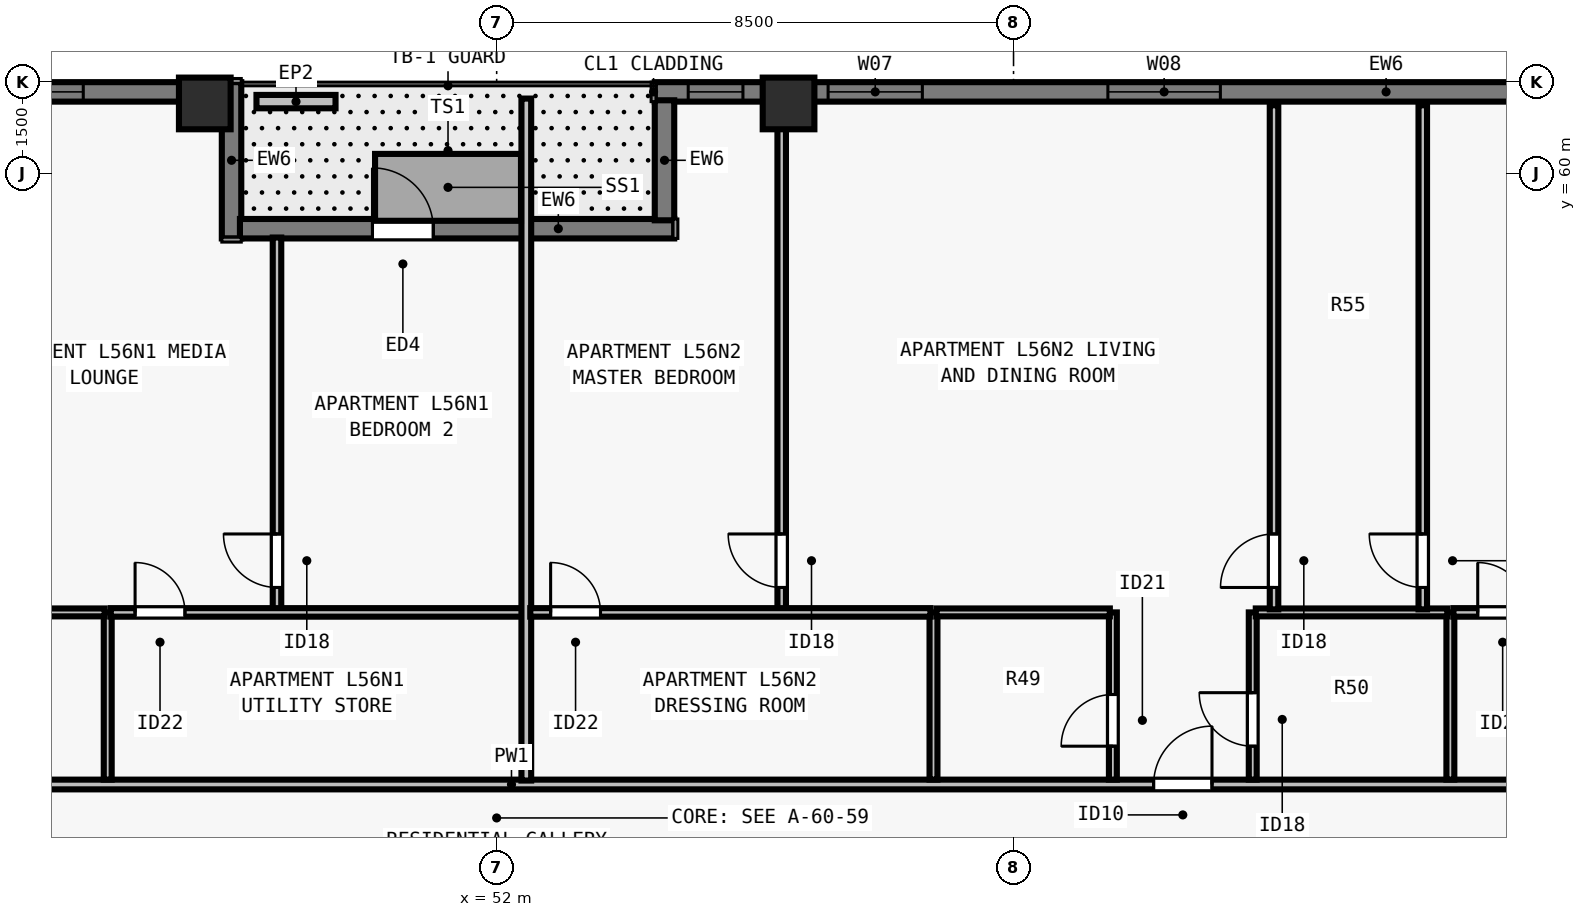
"""IFC4 building model, lengths in metres.
Left out: names, types, materials, properties, quantities, classifications, styles, units other than length and angle.
Written with IfcOpenShell. Run it as: python <this file> out.ifc"""

import sys

from ifc_helpers import new_model, si_unit, direction, frame, frame_2d, origin, origin_2d, place, context, subcontext, project, spatial, rectangle, extrude, element, fill, save


model = new_model("IFC4")
c1 = context("Model", 3, precision=1e-05, world=origin(), true_north=direction((0.0, 1.0)))
c2 = subcontext(c1, "Body", "Model", "MODEL_VIEW")
j1 = project(units=[si_unit("LENGTHUNIT", "METRE"), si_unit("PLANEANGLEUNIT", "RADIAN")], contexts=[c1])
p1 = place(None, origin())
s1 = spatial("IfcSite", under=j1, at=p1, CompositionType="ELEMENT")
p2 = place(p1, origin())
s2 = spatial("IfcBuilding", under=s1, at=p2, CompositionType="ELEMENT")
p3 = place(p2, frame((0.0, 0.0, 206.0)))
s3 = spatial("IfcBuildingStorey", under=s2, at=p3, CompositionType="ELEMENT", Elevation=206.0)
for number, where, z_axis, x_axis in (
    (1, (56.8, 61.15, 0.0), (0.0, 0.0, 1.0), (1.0, 0.0, 0.0)),
    (2, (47.2, 61.15, 0.0), (0.0, 0.0, 1.0), (1.0, 0.0, 0.0)),
):
    element("IfcColumn", number, at=place(p3, frame(where, z_axis=z_axis, x_axis=x_axis)), inside=s3, PredefinedType="COLUMN", context=c2, shape_type="SweptSolid", body=[
        extrude(rectangle(XDim=0.85, YDim=0.85, at=origin_2d()), origin(), (0.0, 0.0, 1.0), 3.5),
    ])
p4 = place(p3, frame((54.6, 61.34, 0.0), z_axis=(0.0, 0.0, 1.0), x_axis=(1.0, 0.0, 0.0)))
e3 = element("IfcWall", 3, at=p4, inside=s3, PredefinedType="SOLIDWALL", context=c2, shape_type="SweptSolid", body=[
    extrude(rectangle(XDim=14.602, YDim=0.32, at=frame_2d((7.301, 0.0))), origin(), (0.0, 0.0, 1.0), 3.29),
])
p5 = place(p4, frame((2.851, 0.0, 0.8)))
e4 = element("IfcOpeningElement", 4, at=p5, cuts=e3, PredefinedType="OPENING", context=c2, shape_type="SweptSolid", body=[
    extrude(rectangle(XDim=1.55, YDim=1.678, at=frame_2d((0.775, 0.839))), frame((0.0, 0.17, 0.0), z_axis=(0.0, -1.0, 0.0), x_axis=(1.0, 0.0, 0.0)), (0.0, 0.0, 1.0), 0.34),
])
p6 = place(p4, frame((7.451, 0.0, 0.8)))
e5 = element("IfcOpeningElement", 5, at=p6, cuts=e3, PredefinedType="OPENING", context=c2, shape_type="SweptSolid", body=[
    extrude(rectangle(XDim=1.85, YDim=1.678, at=frame_2d((0.925, 0.839))), frame((0.0, 0.17, 0.0), z_axis=(0.0, -1.0, 0.0), x_axis=(1.0, 0.0, 0.0)), (0.0, 0.0, 1.0), 0.34),
])
p7 = place(p4, frame((0.55, 0.0, 0.8)))
e6 = element("IfcOpeningElement", 6, at=p7, cuts=e3, PredefinedType="OPENING", context=c2, shape_type="SweptSolid", body=[
    extrude(rectangle(XDim=0.9, YDim=1.678, at=frame_2d((0.45, 0.839))), frame((0.0, 0.17, 0.0), z_axis=(0.0, -1.0, 0.0), x_axis=(1.0, 0.0, 0.0)), (0.0, 0.0, 1.0), 0.34),
])
p8 = place(p3, frame((34.5, 61.34, 0.0), z_axis=(0.0, 0.0, 1.0), x_axis=(1.0, 0.0, 0.0)))
e7 = element("IfcWall", 7, at=p8, inside=s3, PredefinedType="SOLIDWALL", context=c2, shape_type="SweptSolid", body=[
    extrude(rectangle(XDim=13.002, YDim=0.32, at=frame_2d((6.501, 0.0))), origin(), (0.0, 0.0, 1.0), 3.29),
])
p9 = place(p8, frame((5.051, 0.0, 0.8)))
e8 = element("IfcOpeningElement", 8, at=p9, cuts=e7, PredefinedType="OPENING", context=c2, shape_type="SweptSolid", body=[
    extrude(rectangle(XDim=1.55, YDim=1.678, at=frame_2d((0.775, 0.839))), frame((0.0, 0.17, 0.0), z_axis=(0.0, -1.0, 0.0), x_axis=(1.0, 0.0, 0.0)), (0.0, 0.0, 1.0), 0.34),
])
p10 = place(p8, frame((8.852, 0.0, 0.8)))
e9 = element("IfcOpeningElement", 9, at=p10, cuts=e7, PredefinedType="OPENING", context=c2, shape_type="SweptSolid", body=[
    extrude(rectangle(XDim=1.85, YDim=1.678, at=frame_2d((0.925, 0.839))), frame((0.0, 0.17, 0.0), z_axis=(0.0, -1.0, 0.0), x_axis=(1.0, 0.0, 0.0)), (0.0, 0.0, 1.0), 0.34),
])
p11 = place(p3, frame((47.64, 61.5, 0.0), z_axis=(0.0, 0.0, 1.0), x_axis=(0.0, -1.0, 0.0)))
e10 = element("IfcWall", 10, at=p11, inside=s3, PredefinedType="SOLIDWALL", context=c2, shape_type="SweptSolid", body=[
    extrude(rectangle(XDim=2.57, YDim=0.32, at=frame_2d((1.285, 0.0))), origin(), (0.0, 0.0, 1.0), 3.29),
])
p12 = place(p3, frame((47.778, 59.09, 0.0), z_axis=(0.0, 0.0, 1.0), x_axis=(1.0, 0.0, 0.0)))
e11 = element("IfcWall", 11, at=p12, inside=s3, PredefinedType="SOLIDWALL", context=c2, shape_type="SweptSolid", body=[
    extrude(rectangle(XDim=7.142, YDim=0.32, at=frame_2d((3.571, 0.0))), origin(), (0.0, 0.0, 1.0), 3.29),
])
p13 = place(p12, frame((2.18, 0.0, 0.0)))
e12 = element("IfcOpeningElement", 12, at=p13, cuts=e11, PredefinedType="OPENING", context=c2, shape_type="SweptSolid", body=[
    extrude(rectangle(XDim=1.0, YDim=2.15, at=frame_2d((0.5, 1.075))), frame((0.0, 0.17, 0.0), z_axis=(0.0, -1.0, 0.0), x_axis=(1.0, 0.0, 0.0)), (0.0, 0.0, 1.0), 0.34),
])
p14 = place(p3, frame((54.76, 59.228, 0.0), z_axis=(0.0, 0.0, 1.0), x_axis=(0.0, 1.0, 0.0)))
e13 = element("IfcWall", 13, at=p14, inside=s3, PredefinedType="SOLIDWALL", context=c2, shape_type="SweptSolid", body=[
    extrude(rectangle(XDim=1.974, YDim=0.32, at=frame_2d((0.987, 0.0))), origin(), (0.0, 0.0, 1.0), 3.29),
])
p15 = place(p3, frame((48.05, 61.18, 0.0), z_axis=(0.0, 0.0, 1.0), x_axis=(1.0, 0.0, 0.0)))
e14 = element("IfcWall", 14, at=p15, inside=s3, PredefinedType="PARAPET", context=c2, shape_type="SweptSolid", body=[
    extrude(rectangle(XDim=1.3, YDim=0.22, at=frame_2d((0.65, 0.0))), origin(), (0.0, 0.0, 1.0), 0.55),
])
p16 = place(p3, frame((29.805, 49.95, 0.0), z_axis=(0.0, 0.0, 1.0), x_axis=(1.0, 0.0, 0.0)))
e15 = element("IfcWall", 15, at=p16, inside=s3, PredefinedType="PARTITIONING", context=c2, shape_type="SweptSolid", body=[
    extrude(rectangle(XDim=44.39, YDim=0.16, at=frame_2d((22.195, 0.0))), origin(), (0.0, 0.0, 1.0), 2.958),
])
p17 = place(p16, frame((10.919, 0.0, 0.0)))
e16 = element("IfcOpeningElement", 16, at=p17, cuts=e15, PredefinedType="OPENING", context=c2, shape_type="SweptSolid", body=[
    extrude(rectangle(XDim=0.96, YDim=2.18, at=frame_2d((0.48, 1.09))), frame((0.0, 0.09, 0.0), z_axis=(0.0, -1.0, 0.0), x_axis=(1.0, 0.0, 0.0)), (0.0, 0.0, 1.0), 0.18),
])
p18 = place(p16, frame((32.999, 0.0, 0.0)))
e17 = element("IfcOpeningElement", 17, at=p18, cuts=e15, PredefinedType="OPENING", context=c2, shape_type="SweptSolid", body=[
    extrude(rectangle(XDim=0.96, YDim=2.18, at=frame_2d((0.48, 1.09))), frame((0.0, 0.09, 0.0), z_axis=(0.0, -1.0, 0.0), x_axis=(1.0, 0.0, 0.0)), (0.0, 0.0, 1.0), 0.18),
])
p19 = place(p3, frame((45.604, 50.03, 0.0), z_axis=(0.0, 0.0, 1.0), x_axis=(0.0, 1.0, 0.0)))
e18 = element("IfcWall", 18, at=p19, inside=s3, PredefinedType="PLUMBINGWALL", context=c2, shape_type="SweptSolid", body=[
    extrude(rectangle(XDim=2.75, YDim=0.13, at=frame_2d((1.375, 0.0))), origin(), (0.0, 0.0, 1.0), 3.29),
])
p20 = place(p3, frame((42.404, 52.78, 0.0), z_axis=(0.0, 0.0, 1.0), x_axis=(1.0, 0.0, 0.0)))
e19 = element("IfcWall", 19, at=p20, inside=s3, PredefinedType="PLUMBINGWALL", context=c2, shape_type="SweptSolid", body=[
    extrude(rectangle(XDim=3.15, YDim=0.13, at=frame_2d((1.575, 0.0))), origin(), (0.0, 0.0, 1.0), 3.29),
])
p21 = place(p3, frame((48.387, 52.74, 0.0), z_axis=(0.0, 0.0, 1.0), x_axis=(0.0, 1.0, 0.0)))
e20 = element("IfcWall", 20, at=p21, inside=s3, PredefinedType="PARTITIONING", context=c2, shape_type="SweptSolid", body=[
    extrude(rectangle(XDim=6.205, YDim=0.14, at=frame_2d((3.103, 0.0))), origin(), (0.0, 0.0, 1.0), 3.29),
])
p22 = place(p21, frame((0.45, 0.0, 0.0)))
e21 = element("IfcOpeningElement", 21, at=p22, cuts=e20, PredefinedType="OPENING", context=c2, shape_type="SweptSolid", body=[
    extrude(rectangle(XDim=0.88, YDim=2.1, at=frame_2d((0.44, 1.05))), frame((0.0, 0.08, 0.0), z_axis=(0.0, -1.0, 0.0), x_axis=(1.0, 0.0, 0.0)), (0.0, 0.0, 1.0), 0.16),
])
p23 = place(p3, frame((45.654, 52.78, 0.0), z_axis=(0.0, 0.0, 1.0), x_axis=(1.0, 0.0, 0.0)))
e22 = element("IfcWall", 22, at=p23, inside=s3, PredefinedType="PARTITIONING", context=c2, shape_type="SweptSolid", body=[
    extrude(rectangle(XDim=6.884, YDim=0.14, at=frame_2d((3.442, 0.0))), origin(), (0.0, 0.0, 1.0), 3.29),
])
p24 = place(p23, frame((0.4, 0.0, 0.0)))
e23 = element("IfcOpeningElement", 23, at=p24, cuts=e22, PredefinedType="OPENING", context=c2, shape_type="SweptSolid", body=[
    extrude(rectangle(XDim=0.82, YDim=2.1, at=frame_2d((0.41, 1.05))), frame((0.0, 0.08, 0.0), z_axis=(0.0, -1.0, 0.0), x_axis=(1.0, 0.0, 0.0)), (0.0, 0.0, 1.0), 0.16),
])
p25 = place(p3, frame((52.488, 50.015, 0.0), z_axis=(0.0, 0.0, 1.0), x_axis=(0.0, 1.0, 0.0)))
e24 = element("IfcWall", 24, at=p25, inside=s3, PredefinedType="PARTITIONING", context=c2, shape_type="SweptSolid", body=[
    extrude(rectangle(XDim=11.215, YDim=0.16, at=frame_2d((5.607, 0.0))), origin(), (0.0, 0.0, 1.0), 2.958),
])
p26 = place(p3, frame((59.184, 50.03, 0.0), z_axis=(0.0, 0.0, 1.0), x_axis=(0.0, 1.0, 0.0)))
e25 = element("IfcWall", 25, at=p26, inside=s3, PredefinedType="PLUMBINGWALL", context=c2, shape_type="SweptSolid", body=[
    extrude(rectangle(XDim=2.75, YDim=0.13, at=frame_2d((1.375, 0.0))), origin(), (0.0, 0.0, 1.0), 3.29),
])
p27 = place(p3, frame((62.134, 50.03, 0.0), z_axis=(0.0, 0.0, 1.0), x_axis=(0.0, 1.0, 0.0)))
e26 = element("IfcWall", 26, at=p27, inside=s3, PredefinedType="PLUMBINGWALL", context=c2, shape_type="SweptSolid", body=[
    extrude(rectangle(XDim=2.75, YDim=0.13, at=frame_2d((1.375, 0.0))), origin(), (0.0, 0.0, 1.0), 2.573),
])
p28 = place(p27, frame((0.55, 0.0, 0.0)))
e27 = element("IfcOpeningElement", 27, at=p28, cuts=e26, PredefinedType="OPENING", context=c2, shape_type="SweptSolid", body=[
    extrude(rectangle(XDim=0.85, YDim=2.08, at=frame_2d((0.425, 1.04))), frame((0.0, 0.075, 0.0), z_axis=(0.0, -1.0, 0.0), x_axis=(1.0, 0.0, 0.0)), (0.0, 0.0, 1.0), 0.15),
])
p29 = place(p3, frame((59.234, 52.78, 0.0), z_axis=(0.0, 0.0, 1.0), x_axis=(1.0, 0.0, 0.0)))
e28 = element("IfcWall", 28, at=p29, inside=s3, PredefinedType="PLUMBINGWALL", context=c2, shape_type="SweptSolid", body=[
    extrude(rectangle(XDim=2.85, YDim=0.13, at=frame_2d((1.425, 0.0))), origin(), (0.0, 0.0, 1.0), 3.29),
])
p30 = place(p3, frame((67.684, 50.03, 0.0), z_axis=(0.0, 0.0, 1.0), x_axis=(0.0, 1.0, 0.0)))
e29 = element("IfcWall", 29, at=p30, inside=s3, PredefinedType="PLUMBINGWALL", context=c2, shape_type="SweptSolid", body=[
    extrude(rectangle(XDim=2.75, YDim=0.13, at=frame_2d((1.375, 0.0))), origin(), (0.0, 0.0, 1.0), 3.29),
])
p31 = place(p3, frame((64.434, 50.03, 0.0), z_axis=(0.0, 0.0, 1.0), x_axis=(0.0, 1.0, 0.0)))
e30 = element("IfcWall", 30, at=p31, inside=s3, PredefinedType="PLUMBINGWALL", context=c2, shape_type="SweptSolid", body=[
    extrude(rectangle(XDim=2.75, YDim=0.13, at=frame_2d((1.375, 0.0))), origin(), (0.0, 0.0, 1.0), 3.29),
])
p32 = place(p31, frame((0.55, 0.0, 0.0)))
e31 = element("IfcOpeningElement", 31, at=p32, cuts=e30, PredefinedType="OPENING", context=c2, shape_type="SweptSolid", body=[
    extrude(rectangle(XDim=0.88, YDim=2.1, at=frame_2d((0.44, 1.05))), frame((0.0, 0.075, 0.0), z_axis=(0.0, -1.0, 0.0), x_axis=(1.0, 0.0, 0.0)), (0.0, 0.0, 1.0), 0.15),
])
p33 = place(p3, frame((64.484, 52.78, 0.0), z_axis=(0.0, 0.0, 1.0), x_axis=(1.0, 0.0, 0.0)))
e32 = element("IfcWall", 32, at=p33, inside=s3, PredefinedType="PLUMBINGWALL", context=c2, shape_type="SweptSolid", body=[
    extrude(rectangle(XDim=3.15, YDim=0.13, at=frame_2d((1.575, 0.0))), origin(), (0.0, 0.0, 1.0), 3.29),
])
p34 = place(p3, frame((56.688, 52.74, 0.0), z_axis=(0.0, 0.0, 1.0), x_axis=(0.0, 1.0, 0.0)))
e33 = element("IfcWall", 33, at=p34, inside=s3, PredefinedType="PARTITIONING", context=c2, shape_type="SweptSolid", body=[
    extrude(rectangle(XDim=8.38, YDim=0.14, at=frame_2d((4.19, 0.0))), origin(), (0.0, 0.0, 1.0), 2.573),
])
p35 = place(p34, frame((0.45, 0.0, 0.0)))
e34 = element("IfcOpeningElement", 34, at=p35, cuts=e33, PredefinedType="OPENING", context=c2, shape_type="SweptSolid", body=[
    extrude(rectangle(XDim=0.88, YDim=2.1, at=frame_2d((0.44, 1.05))), frame((0.0, 0.08, 0.0), z_axis=(0.0, -1.0, 0.0), x_axis=(1.0, 0.0, 0.0)), (0.0, 0.0, 1.0), 0.16),
])
p36 = place(p3, frame((52.552, 52.78, 0.0), z_axis=(0.0, 0.0, 1.0), x_axis=(1.0, 0.0, 0.0)))
e35 = element("IfcWall", 35, at=p36, inside=s3, PredefinedType="PARTITIONING", context=c2, shape_type="SweptSolid", body=[
    extrude(rectangle(XDim=6.581, YDim=0.14, at=frame_2d((3.291, 0.0))), origin(), (0.0, 0.0, 1.0), 3.29),
])
p37 = place(p36, frame((0.335, 0.0, 0.0)))
e36 = element("IfcOpeningElement", 36, at=p37, cuts=e35, PredefinedType="OPENING", context=c2, shape_type="SweptSolid", body=[
    extrude(rectangle(XDim=0.82, YDim=2.1, at=frame_2d((0.41, 1.05))), frame((0.0, 0.08, 0.0), z_axis=(0.0, -1.0, 0.0), x_axis=(1.0, 0.0, 0.0)), (0.0, 0.0, 1.0), 0.16),
])
p38 = place(p3, frame((67.23, 52.83, 0.0), z_axis=(0.0, 0.0, 1.0), x_axis=(0.0, 1.0, 0.0)))
e37 = element("IfcWall", 37, at=p38, inside=s3, PredefinedType="PARTITIONING", context=c2, shape_type="SweptSolid", body=[
    extrude(rectangle(XDim=8.29, YDim=0.14, at=frame_2d((4.145, 0.0))), origin(), (0.0, 0.0, 1.0), 2.573),
])
p39 = place(p38, frame((0.36, 0.0, 0.0)))
e38 = element("IfcOpeningElement", 38, at=p39, cuts=e37, PredefinedType="OPENING", context=c2, shape_type="SweptSolid", body=[
    extrude(rectangle(XDim=0.88, YDim=2.1, at=frame_2d((0.44, 1.05))), frame((0.0, 0.08, 0.0), z_axis=(0.0, -1.0, 0.0), x_axis=(1.0, 0.0, 0.0)), (0.0, 0.0, 1.0), 0.16),
])
p40 = place(p3, frame((67.734, 52.78, 0.0), z_axis=(0.0, 0.0, 1.0), x_axis=(1.0, 0.0, 0.0)))
e39 = element("IfcWall", 39, at=p40, inside=s3, PredefinedType="PARTITIONING", context=c2, shape_type="SweptSolid", body=[
    extrude(rectangle(XDim=6.396, YDim=0.14, at=frame_2d((3.198, 0.0))), origin(), (0.0, 0.0, 1.0), 2.958),
])
p41 = place(p40, frame((0.4, 0.0, 0.0)))
e40 = element("IfcOpeningElement", 40, at=p41, cuts=e39, PredefinedType="OPENING", context=c2, shape_type="SweptSolid", body=[
    extrude(rectangle(XDim=0.82, YDim=2.1, at=frame_2d((0.41, 1.05))), frame((0.0, 0.08, 0.0), z_axis=(0.0, -1.0, 0.0), x_axis=(1.0, 0.0, 0.0)), (0.0, 0.0, 1.0), 0.16),
])
p42 = place(p3, frame((64.784, 52.83, 0.0), z_axis=(0.0, 0.0, 1.0), x_axis=(0.0, 1.0, 0.0)))
e41 = element("IfcWall", 41, at=p42, inside=s3, PredefinedType="PARTITIONING", context=c2, shape_type="SweptSolid", body=[
    extrude(rectangle(XDim=8.29, YDim=0.14, at=frame_2d((4.145, 0.0))), origin(), (0.0, 0.0, 1.0), 2.573),
])
p43 = place(p42, frame((0.36, 0.0, 0.0)))
e42 = element("IfcOpeningElement", 42, at=p43, cuts=e41, PredefinedType="OPENING", context=c2, shape_type="SweptSolid", body=[
    extrude(rectangle(XDim=0.88, YDim=2.1, at=frame_2d((0.44, 1.05))), frame((0.0, 0.08, 0.0), z_axis=(0.0, -1.0, 0.0), x_axis=(1.0, 0.0, 0.0)), (0.0, 0.0, 1.0), 0.16),
])
p44 = place(p5, origin())
e43 = element("IfcWindow", 43, at=p44, inside=s3, PartitioningType="SINGLE_PANEL", PredefinedType="WINDOW", context=c2, shape_type="SweptSolid", body=[
    extrude(rectangle(XDim=1.55, YDim=1.678, at=frame_2d((0.775, 0.839))), frame((0.0, -0.05, 0.0), z_axis=(0.0, -1.0, 0.0), x_axis=(1.0, 0.0, 0.0)), (0.0, 0.0, 1.0), 0.06),
])
fill(e4, e43)
p45 = place(p6, origin())
e44 = element("IfcWindow", 44, at=p45, inside=s3, PartitioningType="SINGLE_PANEL", PredefinedType="WINDOW", context=c2, shape_type="SweptSolid", body=[
    extrude(rectangle(XDim=1.85, YDim=1.678, at=frame_2d((0.925, 0.839))), frame((0.0, -0.05, 0.0), z_axis=(0.0, -1.0, 0.0), x_axis=(1.0, 0.0, 0.0)), (0.0, 0.0, 1.0), 0.06),
])
fill(e5, e44)
p46 = place(p10, origin())
e45 = element("IfcWindow", 45, at=p46, inside=s3, PartitioningType="SINGLE_PANEL", PredefinedType="WINDOW", context=c2, shape_type="SweptSolid", body=[
    extrude(rectangle(XDim=1.85, YDim=1.678, at=frame_2d((0.925, 0.839))), frame((0.0, -0.05, 0.0), z_axis=(0.0, -1.0, 0.0), x_axis=(1.0, 0.0, 0.0)), (0.0, 0.0, 1.0), 0.06),
])
fill(e9, e45)
p47 = place(p13, origin())
e46 = element("IfcDoor", 46, at=p47, inside=s3, OperationType="SINGLE_SWING_LEFT", PredefinedType="DOOR", context=c2, shape_type="SweptSolid", body=[
    extrude(rectangle(XDim=1.0, YDim=2.15, at=frame_2d((0.5, 1.075))), frame((0.0, 0.025, 0.0), z_axis=(0.0, -1.0, 0.0), x_axis=(1.0, 0.0, 0.0)), (0.0, 0.0, 1.0), 0.05),
])
fill(e12, e46)
p48 = place(p7, origin())
e47 = element("IfcWindow", 47, at=p48, inside=s3, PartitioningType="SINGLE_PANEL", PredefinedType="WINDOW", context=c2, shape_type="SweptSolid", body=[
    extrude(rectangle(XDim=0.9, YDim=1.678, at=frame_2d((0.45, 0.839))), frame((0.0, -0.04, 0.0), z_axis=(0.0, -1.0, 0.0), x_axis=(1.0, 0.0, 0.0)), (0.0, 0.0, 1.0), 0.06),
])
fill(e6, e47)
p49 = place(p24, origin())
e48 = element("IfcDoor", 48, at=p49, inside=s3, OperationType="SINGLE_SWING_LEFT", PredefinedType="DOOR", context=c2, shape_type="SweptSolid", body=[
    extrude(rectangle(XDim=0.82, YDim=2.1, at=frame_2d((0.41, 1.05))), frame((0.0, 0.025, 0.0), z_axis=(0.0, -1.0, 0.0), x_axis=(1.0, 0.0, 0.0)), (0.0, 0.0, 1.0), 0.05),
])
fill(e23, e48)
p50 = place(p22, origin())
e49 = element("IfcDoor", 49, at=p50, inside=s3, OperationType="SINGLE_SWING_RIGHT", PredefinedType="DOOR", context=c2, shape_type="SweptSolid", body=[
    extrude(rectangle(XDim=0.88, YDim=2.1, at=frame_2d((0.44, 1.05))), frame((0.0, 0.025, 0.0), z_axis=(0.0, -1.0, 0.0), x_axis=(1.0, 0.0, 0.0)), (0.0, 0.0, 1.0), 0.05),
])
fill(e21, e49)
p51 = place(p28, origin())
e50 = element("IfcDoor", 50, at=p51, inside=s3, OperationType="SINGLE_SWING_LEFT", PredefinedType="DOOR", context=c2, shape_type="SweptSolid", body=[
    extrude(rectangle(XDim=0.85, YDim=2.08, at=frame_2d((0.425, 1.04))), frame((0.0, 0.025, 0.0), z_axis=(0.0, -1.0, 0.0), x_axis=(1.0, 0.0, 0.0)), (0.0, 0.0, 1.0), 0.05),
])
fill(e27, e50)
p52 = place(p32, origin())
e51 = element("IfcDoor", 51, at=p52, inside=s3, OperationType="SINGLE_SWING_RIGHT", PredefinedType="DOOR", context=c2, shape_type="SweptSolid", body=[
    extrude(rectangle(XDim=0.88, YDim=2.1, at=frame_2d((0.44, 1.05))), frame((0.0, 0.025, 0.0), z_axis=(0.0, -1.0, 0.0), x_axis=(1.0, 0.0, 0.0)), (0.0, 0.0, 1.0), 0.05),
])
fill(e31, e51)
p53 = place(p37, origin())
e52 = element("IfcDoor", 52, at=p53, inside=s3, OperationType="SINGLE_SWING_LEFT", PredefinedType="DOOR", context=c2, shape_type="SweptSolid", body=[
    extrude(rectangle(XDim=0.82, YDim=2.1, at=frame_2d((0.41, 1.05))), frame((0.0, 0.025, 0.0), z_axis=(0.0, -1.0, 0.0), x_axis=(1.0, 0.0, 0.0)), (0.0, 0.0, 1.0), 0.05),
])
fill(e36, e52)
p54 = place(p35, origin())
e53 = element("IfcDoor", 53, at=p54, inside=s3, OperationType="SINGLE_SWING_RIGHT", PredefinedType="DOOR", context=c2, shape_type="SweptSolid", body=[
    extrude(rectangle(XDim=0.88, YDim=2.1, at=frame_2d((0.44, 1.05))), frame((0.0, 0.025, 0.0), z_axis=(0.0, -1.0, 0.0), x_axis=(1.0, 0.0, 0.0)), (0.0, 0.0, 1.0), 0.05),
])
fill(e34, e53)
p55 = place(p41, origin())
e54 = element("IfcDoor", 54, at=p55, inside=s3, OperationType="SINGLE_SWING_LEFT", PredefinedType="DOOR", context=c2, shape_type="SweptSolid", body=[
    extrude(rectangle(XDim=0.82, YDim=2.1, at=frame_2d((0.41, 1.05))), frame((0.0, 0.025, 0.0), z_axis=(0.0, -1.0, 0.0), x_axis=(1.0, 0.0, 0.0)), (0.0, 0.0, 1.0), 0.05),
])
fill(e40, e54)
p56 = place(p39, origin())
e55 = element("IfcDoor", 55, at=p56, inside=s3, OperationType="SINGLE_SWING_RIGHT", PredefinedType="DOOR", context=c2, shape_type="SweptSolid", body=[
    extrude(rectangle(XDim=0.88, YDim=2.1, at=frame_2d((0.44, 1.05))), frame((0.0, 0.025, 0.0), z_axis=(0.0, -1.0, 0.0), x_axis=(1.0, 0.0, 0.0)), (0.0, 0.0, 1.0), 0.05),
])
fill(e38, e55)
p57 = place(p43, origin())
e56 = element("IfcDoor", 56, at=p57, inside=s3, OperationType="SINGLE_SWING_LEFT", PredefinedType="DOOR", context=c2, shape_type="SweptSolid", body=[
    extrude(rectangle(XDim=0.88, YDim=2.1, at=frame_2d((0.44, 1.05))), frame((0.0, 0.025, 0.0), z_axis=(0.0, -1.0, 0.0), x_axis=(1.0, 0.0, 0.0)), (0.0, 0.0, 1.0), 0.05),
])
fill(e42, e56)
p58 = place(p18, origin())
e57 = element("IfcDoor", 57, at=p58, inside=s3, OperationType="SINGLE_SWING_RIGHT", PredefinedType="DOOR", context=c2, shape_type="SweptSolid", body=[
    extrude(rectangle(XDim=0.96, YDim=2.18, at=frame_2d((0.48, 1.09))), frame((0.0, 0.025, 0.0), z_axis=(0.0, -1.0, 0.0), x_axis=(1.0, 0.0, 0.0)), (0.0, 0.0, 1.0), 0.05),
])
fill(e17, e57)
save(model, sys.argv[1])
